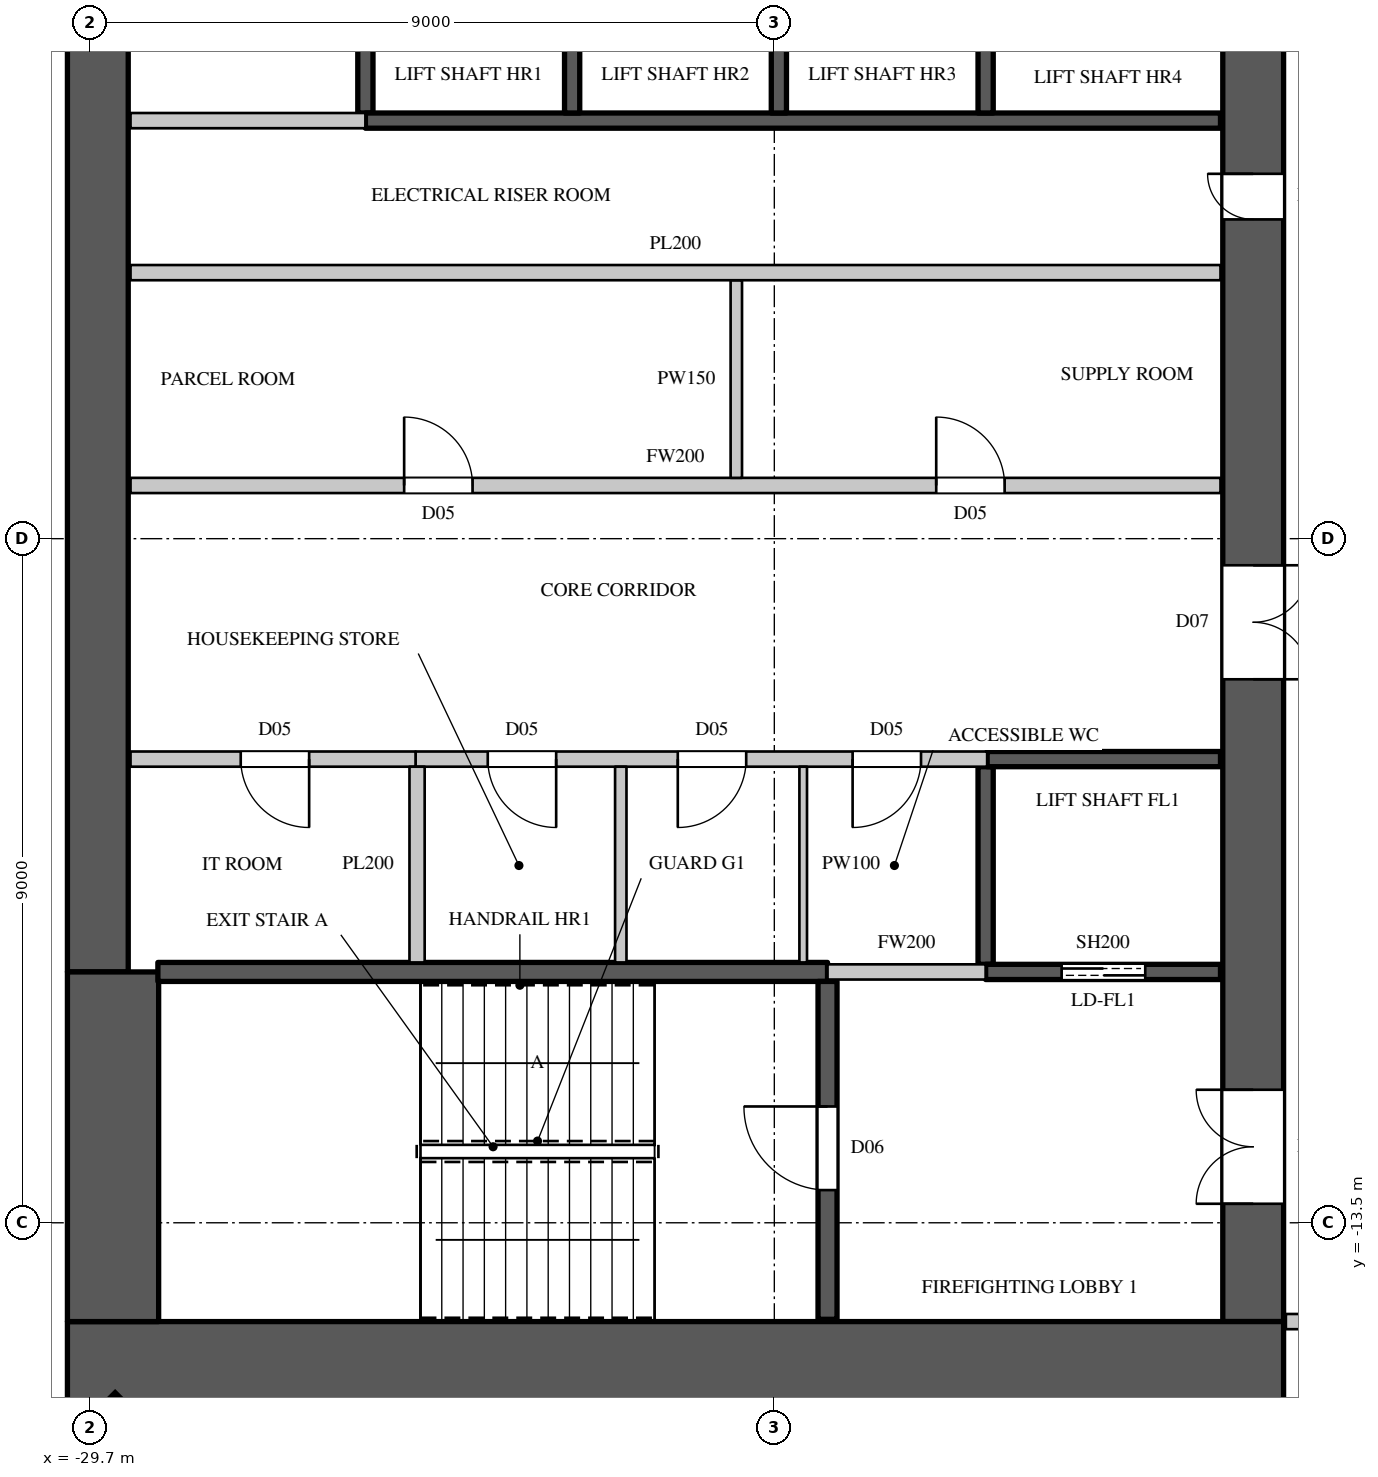
"""IFC4 building model, lengths in metres.
Left out: names, types, materials, properties, quantities, classifications, styles, units other than length and angle.
Written with IfcOpenShell. Run it as: python <this file> out.ifc"""

import sys

from ifc_helpers import new_model, si_unit, direction, frame, frame_2d, origin, origin_2d, place, context, subcontext, project, spatial, rectangle, extrude, element, fill, save


model = new_model("IFC4")
c1 = context("Model", 3, precision=1e-05, world=origin(), true_north=direction((0.0, 1.0)))
c2 = subcontext(c1, "Body", "Model", "MODEL_VIEW")
j1 = project(units=[si_unit("LENGTHUNIT", "METRE"), si_unit("PLANEANGLEUNIT", "RADIAN")], contexts=[c1])
p1 = place(None, origin())
s1 = spatial("IfcSite", under=j1, at=p1, CompositionType="ELEMENT")
p2 = place(p1, origin())
s2 = spatial("IfcBuilding", under=s1, at=p2, CompositionType="ELEMENT")
p3 = place(p2, frame((0.0, 0.0, 213.8)))
s3 = spatial("IfcBuildingStorey", under=s2, at=p3, CompositionType="ELEMENT", Elevation=213.8)
p4 = place(p3, frame((-29.443, -16.443, 0.0), z_axis=(0.0, 0.0, 1.0), x_axis=(0.707106781187, -0.707106781187, 0.0)))
e1 = element("IfcColumn", 1, at=p4, inside=s3, PredefinedType="COLUMN", context=c2, shape_type="SweptSolid", body=[
    extrude(rectangle(XDim=0.9, YDim=1.1, at=origin_2d()), origin(), (0.0, 0.0, 1.0), 4.1),
])
p5 = place(p3, frame((-30.0, -15.4, 0.0), z_axis=(0.0, 0.0, 1.0), x_axis=(1.0, 0.0, 0.0)))
e2 = element("IfcWall", 2, at=p5, inside=s3, PredefinedType="SHEAR", context=c2, shape_type="SweptSolid", body=[
    extrude(rectangle(XDim=16.0, YDim=1.2, at=frame_2d((8.0, 0.0))), origin(), (0.0, 0.0, 1.0), 4.1),
])
p6 = place(p3, frame((-14.4, -14.8, 0.0), z_axis=(0.0, 0.0, 1.0), x_axis=(0.0, 1.0, 0.0)))
e3 = element("IfcWall", 3, at=p6, inside=s3, PredefinedType="SHEAR", context=c2, shape_type="SweptSolid", body=[
    extrude(rectangle(XDim=29.6, YDim=0.8, at=frame_2d((14.8, 0.0))), origin(), (0.0, 0.0, 1.0), 4.1),
])
p7 = place(p6, frame((1.55, 0.0, 0.0)))
e4 = element("IfcOpeningElement", 4, at=p7, cuts=e3, PredefinedType="OPENING", context=c2, shape_type="SweptSolid", body=[
    extrude(rectangle(XDim=1.5, YDim=2.4, at=frame_2d((0.75, 1.2))), frame((0.0, 0.41, 0.0), z_axis=(0.0, -1.0, 0.0), x_axis=(1.0, 0.0, 0.0)), (0.0, 0.0, 1.0), 0.82),
])
p8 = place(p6, frame((26.55, 0.0, 0.0)))
e5 = element("IfcOpeningElement", 5, at=p8, cuts=e3, PredefinedType="OPENING", context=c2, shape_type="SweptSolid", body=[
    extrude(rectangle(XDim=1.5, YDim=2.4, at=frame_2d((0.75, 1.2))), frame((0.0, 0.41, 0.0), z_axis=(0.0, -1.0, 0.0), x_axis=(1.0, 0.0, 0.0)), (0.0, 0.0, 1.0), 0.82),
])
p9 = place(p6, frame((8.45, 0.0, 0.0)))
e6 = element("IfcOpeningElement", 6, at=p9, cuts=e3, PredefinedType="OPENING", context=c2, shape_type="SweptSolid", body=[
    extrude(rectangle(XDim=1.5, YDim=2.4, at=frame_2d((0.75, 1.2))), frame((0.0, 0.41, 0.0), z_axis=(0.0, -1.0, 0.0), x_axis=(1.0, 0.0, 0.0)), (0.0, 0.0, 1.0), 0.82),
])
p10 = place(p6, frame((19.65, 0.0, 0.0)))
e7 = element("IfcOpeningElement", 7, at=p10, cuts=e3, PredefinedType="OPENING", context=c2, shape_type="SweptSolid", body=[
    extrude(rectangle(XDim=1.5, YDim=2.4, at=frame_2d((0.75, 1.2))), frame((0.0, 0.41, 0.0), z_axis=(0.0, -1.0, 0.0), x_axis=(1.0, 0.0, 0.0)), (0.0, 0.0, 1.0), 0.82),
])
p11 = place(p6, frame((14.5, 0.0, 0.0)))
e8 = element("IfcOpeningElement", 8, at=p11, cuts=e3, PredefinedType="OPENING", context=c2, shape_type="SweptSolid", body=[
    extrude(rectangle(XDim=0.6, YDim=2.0, at=frame_2d((0.3, 1.0))), frame((0.0, 0.41, 0.0), z_axis=(0.0, -1.0, 0.0), x_axis=(1.0, 0.0, 0.0)), (0.0, 0.0, 1.0), 0.82),
])
p12 = place(p3, frame((-29.6, -10.2, 0.0), z_axis=(0.0, 0.0, 1.0), x_axis=(0.0, 1.0, 0.0)))
e9 = element("IfcWall", 9, at=p12, inside=s3, PredefinedType="SHEAR", context=c2, shape_type="SweptSolid", body=[
    extrude(rectangle(XDim=20.4, YDim=0.8, at=frame_2d((10.2, 0.0))), origin(), (0.0, 0.0, 1.0), 4.1),
])
p13 = place(p3, frame((-29.4, -14.8, 0.0), z_axis=(0.0, 0.0, 1.0), x_axis=(0.0, 1.0, 0.0)))
e10 = element("IfcWall", 10, at=p13, inside=s3, PredefinedType="SHEAR", context=c2, shape_type="SweptSolid", body=[
    extrude(rectangle(XDim=4.6, YDim=1.2, at=frame_2d((2.3, 0.0))), origin(), (0.0, 0.0, 1.0), 4.1),
])
p14 = place(p3, frame((-29.17, -3.8, 0.0), z_axis=(0.0, 0.0, 1.0), x_axis=(1.0, 0.0, 0.0)))
e11 = element("IfcWall", 11, at=p14, inside=s3, PredefinedType="PARTITIONING", context=c2, shape_type="SweptSolid", body=[
    extrude(rectangle(XDim=14.34, YDim=0.2, at=frame_2d((7.17, 0.0))), origin(), (0.0, 0.0, 1.0), 3.8),
])
p15 = place(p14, frame((3.6, 0.0, 0.0)))
e12 = element("IfcOpeningElement", 12, at=p15, cuts=e11, PredefinedType="OPENING", context=c2, shape_type="SweptSolid", body=[
    extrude(rectangle(XDim=0.9, YDim=2.2, at=frame_2d((0.45, 1.1))), frame((0.0, 0.11, 0.0), z_axis=(0.0, -1.0, 0.0), x_axis=(1.0, 0.0, 0.0)), (0.0, 0.0, 1.0), 0.22),
])
p16 = place(p14, frame((10.6, 0.0, 0.0)))
e13 = element("IfcOpeningElement", 13, at=p16, cuts=e11, PredefinedType="OPENING", context=c2, shape_type="SweptSolid", body=[
    extrude(rectangle(XDim=0.9, YDim=2.2, at=frame_2d((0.45, 1.1))), frame((0.0, 0.11, 0.0), z_axis=(0.0, -1.0, 0.0), x_axis=(1.0, 0.0, 0.0)), (0.0, 0.0, 1.0), 0.22),
])
p17 = place(p3, frame((-25.42, -7.4, 0.0), z_axis=(0.0, 0.0, 1.0), x_axis=(1.0, 0.0, 0.0)))
e14 = element("IfcWall", 14, at=p17, inside=s3, PredefinedType="PARTITIONING", context=c2, shape_type="SweptSolid", body=[
    extrude(rectangle(XDim=7.52, YDim=0.2, at=frame_2d((3.76, 0.0))), origin(), (0.0, 0.0, 1.0), 3.8),
])
p18 = place(p17, frame((0.95, 0.0, 0.0)))
e15 = element("IfcOpeningElement", 15, at=p18, cuts=e14, PredefinedType="OPENING", context=c2, shape_type="SweptSolid", body=[
    extrude(rectangle(XDim=0.9, YDim=2.2, at=frame_2d((0.45, 1.1))), frame((0.0, 0.11, 0.0), z_axis=(0.0, -1.0, 0.0), x_axis=(1.0, 0.0, 0.0)), (0.0, 0.0, 1.0), 0.22),
])
p19 = place(p17, frame((3.45, 0.0, 0.0)))
e16 = element("IfcOpeningElement", 16, at=p19, cuts=e14, PredefinedType="OPENING", context=c2, shape_type="SweptSolid", body=[
    extrude(rectangle(XDim=0.9, YDim=2.2, at=frame_2d((0.45, 1.1))), frame((0.0, 0.11, 0.0), z_axis=(0.0, -1.0, 0.0), x_axis=(1.0, 0.0, 0.0)), (0.0, 0.0, 1.0), 0.22),
])
p20 = place(p17, frame((5.75, 0.0, 0.0)))
e17 = element("IfcOpeningElement", 17, at=p20, cuts=e14, PredefinedType="OPENING", context=c2, shape_type="SweptSolid", body=[
    extrude(rectangle(XDim=0.9, YDim=2.2, at=frame_2d((0.45, 1.1))), frame((0.0, 0.11, 0.0), z_axis=(0.0, -1.0, 0.0), x_axis=(1.0, 0.0, 0.0)), (0.0, 0.0, 1.0), 0.22),
])
p21 = place(p3, frame((-20.0, -10.2, 0.0), z_axis=(0.0, 0.0, 1.0), x_axis=(1.0, 0.0, 0.0)))
e18 = element("IfcWall", 18, at=p21, inside=s3, PredefinedType="PARTITIONING", context=c2, shape_type="SweptSolid", body=[
    extrude(rectangle(XDim=2.08, YDim=0.2, at=frame_2d((1.04, 0.0))), origin(), (0.0, 0.0, 1.0), 3.8),
])
p22 = place(p3, frame((-13.97, -14.8, 0.0), z_axis=(0.0, 0.0, 1.0), x_axis=(1.0, 0.0, 0.0)))
e19 = element("IfcWall", 19, at=p22, inside=s3, PredefinedType="PARTITIONING", context=c2, shape_type="SweptSolid", body=[
    extrude(rectangle(XDim=2.87, YDim=0.2, at=frame_2d((1.435, 0.0))), origin(), (0.0, 0.0, 1.0), 3.8),
])
p23 = place(p3, frame((-22.72, -10.075, 0.0), z_axis=(0.0, 0.0, 1.0), x_axis=(0.0, 1.0, 0.0)))
e20 = element("IfcWall", 20, at=p23, inside=s3, PredefinedType="PARTITIONING", context=c2, shape_type="SweptSolid", body=[
    extrude(rectangle(XDim=2.575, YDim=0.15, at=frame_2d((1.288, 0.0))), origin(), (0.0, 0.0, 1.0), 3.8),
])
p24 = place(p3, frame((-21.2, -3.7, 0.0), z_axis=(0.0, 0.0, 1.0), x_axis=(0.0, 1.0, 0.0)))
e21 = element("IfcWall", 21, at=p24, inside=s3, PredefinedType="PARTITIONING", context=c2, shape_type="SweptSolid", body=[
    extrude(rectangle(XDim=2.6, YDim=0.15, at=frame_2d((1.3, 0.0))), origin(), (0.0, 0.0, 1.0), 3.8),
])
p25 = place(p3, frame((-29.17, -7.4, 0.0), z_axis=(0.0, 0.0, 1.0), x_axis=(1.0, 0.0, 0.0)))
e22 = element("IfcWall", 22, at=p25, inside=s3, PredefinedType="PARTITIONING", context=c2, shape_type="SweptSolid", body=[
    extrude(rectangle(XDim=3.75, YDim=0.2, at=frame_2d((1.875, 0.0))), origin(), (0.0, 0.0, 1.0), 3.8),
])
p26 = place(p25, frame((1.45, 0.0, 0.0)))
e23 = element("IfcOpeningElement", 23, at=p26, cuts=e22, PredefinedType="OPENING", context=c2, shape_type="SweptSolid", body=[
    extrude(rectangle(XDim=0.9, YDim=2.2, at=frame_2d((0.45, 1.1))), frame((0.0, 0.11, 0.0), z_axis=(0.0, -1.0, 0.0), x_axis=(1.0, 0.0, 0.0)), (0.0, 0.0, 1.0), 0.22),
])
p27 = place(p3, frame((-29.17, -1.0, 0.0), z_axis=(0.0, 0.0, 1.0), x_axis=(1.0, 0.0, 0.0)))
e24 = element("IfcWall", 24, at=p27, inside=s3, PredefinedType="PARTITIONING", context=c2, shape_type="SweptSolid", body=[
    extrude(rectangle(XDim=14.34, YDim=0.2, at=frame_2d((7.17, 0.0))), origin(), (0.0, 0.0, 1.0), 3.8),
])
p28 = place(p3, frame((-29.17, 1.0, 0.0), z_axis=(0.0, 0.0, 1.0), x_axis=(1.0, 0.0, 0.0)))
e25 = element("IfcWall", 25, at=p28, inside=s3, PredefinedType="PARTITIONING", context=c2, shape_type="SweptSolid", body=[
    extrude(rectangle(XDim=3.09, YDim=0.2, at=frame_2d((1.545, 0.0))), origin(), (0.0, 0.0, 1.0), 3.8),
])
p29 = place(p3, frame((-25.4, -10.075, 0.0), z_axis=(0.0, 0.0, 1.0), x_axis=(0.0, 1.0, 0.0)))
e26 = element("IfcWall", 26, at=p29, inside=s3, PredefinedType="PARTITIONING", context=c2, shape_type="SweptSolid", body=[
    extrude(rectangle(XDim=2.575, YDim=0.2, at=frame_2d((1.288, 0.0))), origin(), (0.0, 0.0, 1.0), 3.8),
])
p30 = place(p3, frame((-26.08, 1.1, 0.0), z_axis=(0.0, 0.0, 1.0), x_axis=(0.0, 1.0, 0.0)))
e27 = element("IfcWall", 27, at=p30, inside=s3, PredefinedType="SHEAR", context=c2, shape_type="SweptSolid", body=[
    extrude(rectangle(XDim=2.6, YDim=0.2, at=frame_2d((1.3, 0.0))), origin(), (0.0, 0.0, 1.0), 3.8),
])
p31 = place(p3, frame((-26.08, 1.0, 0.0), z_axis=(0.0, 0.0, 1.0), x_axis=(1.0, 0.0, 0.0)))
e28 = element("IfcWall", 28, at=p31, inside=s3, PredefinedType="SHEAR", context=c2, shape_type="SweptSolid", body=[
    extrude(rectangle(XDim=11.25, YDim=0.2, at=frame_2d((5.625, 0.0))), origin(), (0.0, 0.0, 1.0), 3.8),
])
for number, where, z_axis, x_axis in (
    (29, (-23.36, 1.1, 0.0), (0.0, 0.0, 1.0), (0.0, 1.0, 0.0)),
    (30, (-20.64, 1.1, 0.0), (0.0, 0.0, 1.0), (0.0, 1.0, 0.0)),
):
    element("IfcWall", number, at=place(p3, frame(where, z_axis=z_axis, x_axis=x_axis)), inside=s3, PredefinedType="SHEAR", context=c2, shape_type="SweptSolid", body=[
        extrude(rectangle(XDim=2.6, YDim=0.2, at=frame_2d((1.3, 0.0))), origin(), (0.0, 0.0, 1.0), 4.1),
    ])
p32 = place(p3, frame((-17.92, -10.1, 0.0), z_axis=(0.0, 0.0, 1.0), x_axis=(0.0, 1.0, 0.0)))
e31 = element("IfcWall", 31, at=p32, inside=s3, PredefinedType="SHEAR", context=c2, shape_type="SweptSolid", body=[
    extrude(rectangle(XDim=2.6, YDim=0.2, at=frame_2d((1.3, 0.0))), origin(), (0.0, 0.0, 1.0), 3.8),
])
p33 = place(p3, frame((-17.92, -10.2, 0.0), z_axis=(0.0, 0.0, 1.0), x_axis=(1.0, 0.0, 0.0)))
e32 = element("IfcWall", 32, at=p33, inside=s3, PredefinedType="SHEAR", context=c2, shape_type="SweptSolid", body=[
    extrude(rectangle(XDim=3.09, YDim=0.2, at=frame_2d((1.545, 0.0))), origin(), (0.0, 0.0, 1.0), 3.8),
])
p34 = place(p33, frame((1.0, 0.0, 0.0)))
e33 = element("IfcOpeningElement", 33, at=p34, cuts=e32, PredefinedType="OPENING", context=c2, shape_type="SweptSolid", body=[
    extrude(rectangle(XDim=1.1, YDim=2.2, at=frame_2d((0.55, 1.1))), frame((0.0, 0.11, 0.0), z_axis=(0.0, -1.0, 0.0), x_axis=(1.0, 0.0, 0.0)), (0.0, 0.0, 1.0), 0.22),
])
p35 = place(p3, frame((-17.9, -7.4, 0.0), z_axis=(0.0, 0.0, 1.0), x_axis=(1.0, 0.0, 0.0)))
e34 = element("IfcWall", 34, at=p35, inside=s3, PredefinedType="SHEAR", context=c2, shape_type="SweptSolid", body=[
    extrude(rectangle(XDim=3.07, YDim=0.2, at=frame_2d((1.535, 0.0))), origin(), (0.0, 0.0, 1.0), 3.8),
])
p36 = place(p3, frame((-17.92, 1.1, 0.0), z_axis=(0.0, 0.0, 1.0), x_axis=(0.0, 1.0, 0.0)))
e35 = element("IfcWall", 35, at=p36, inside=s3, PredefinedType="SHEAR", context=c2, shape_type="SweptSolid", body=[
    extrude(rectangle(XDim=2.6, YDim=0.2, at=frame_2d((1.3, 0.0))), origin(), (0.0, 0.0, 1.0), 4.1),
])
p37 = place(p3, frame((-28.81, -10.2, 0.0), z_axis=(0.0, 0.0, 1.0), x_axis=(1.0, 0.0, 0.0)))
e36 = element("IfcWall", 36, at=p37, inside=s3, PredefinedType="SHEAR", context=c2, shape_type="SweptSolid", body=[
    extrude(rectangle(XDim=8.81, YDim=0.25, at=frame_2d((4.405, 0.0))), origin(), (0.0, 0.0, 1.0), 3.8),
])
p38 = place(p3, frame((-20.0, -14.77, 0.0), z_axis=(0.0, 0.0, 1.0), x_axis=(0.0, 1.0, 0.0)))
e37 = element("IfcWall", 37, at=p38, inside=s3, PredefinedType="SHEAR", context=c2, shape_type="SweptSolid", body=[
    extrude(rectangle(XDim=4.445, YDim=0.25, at=frame_2d((2.223, 0.0))), origin(), (0.0, 0.0, 1.0), 3.8),
])
p39 = place(p38, frame((1.7, 0.0, 0.0)))
e38 = element("IfcOpeningElement", 38, at=p39, cuts=e37, PredefinedType="OPENING", context=c2, shape_type="SweptSolid", body=[
    extrude(rectangle(XDim=1.1, YDim=2.2, at=frame_2d((0.55, 1.1))), frame((0.0, 0.135, 0.0), z_axis=(0.0, -1.0, 0.0), x_axis=(1.0, 0.0, 0.0)), (0.0, 0.0, 1.0), 0.27),
])
p40 = place(p3, frame((-20.32, -10.075, 0.0), z_axis=(0.0, 0.0, 1.0), x_axis=(0.0, 1.0, 0.0)))
e39 = element("IfcWall", 39, at=p40, inside=s3, PredefinedType="PARTITIONING", context=c2, shape_type="SweptSolid", body=[
    extrude(rectangle(XDim=2.575, YDim=0.1, at=frame_2d((1.288, 0.0))), origin(), (0.0, 0.0, 1.0), 3.8),
])
p41 = place(p39, origin())
e40 = element("IfcDoor", 40, at=p41, inside=s3, OperationType="SINGLE_SWING_RIGHT", PredefinedType="DOOR", context=c2, shape_type="SweptSolid", body=[
    extrude(rectangle(XDim=1.1, YDim=2.2, at=frame_2d((0.55, 1.1))), frame((0.0, 0.025, 0.0), z_axis=(0.0, -1.0, 0.0), x_axis=(1.0, 0.0, 0.0)), (0.0, 0.0, 1.0), 0.05),
])
fill(e38, e40)
p42 = place(p26, origin())
e41 = element("IfcDoor", 41, at=p42, inside=s3, OperationType="SINGLE_SWING_LEFT", PredefinedType="DOOR", context=c2, shape_type="SweptSolid", body=[
    extrude(rectangle(XDim=0.9, YDim=2.2, at=frame_2d((0.45, 1.1))), frame((0.0, 0.025, 0.0), z_axis=(0.0, -1.0, 0.0), x_axis=(1.0, 0.0, 0.0)), (0.0, 0.0, 1.0), 0.05),
])
fill(e23, e41)
p43 = place(p18, origin())
e42 = element("IfcDoor", 42, at=p43, inside=s3, OperationType="SINGLE_SWING_LEFT", PredefinedType="DOOR", context=c2, shape_type="SweptSolid", body=[
    extrude(rectangle(XDim=0.9, YDim=2.2, at=frame_2d((0.45, 1.1))), frame((0.0, 0.025, 0.0), z_axis=(0.0, -1.0, 0.0), x_axis=(1.0, 0.0, 0.0)), (0.0, 0.0, 1.0), 0.05),
])
fill(e15, e42)
p44 = place(p19, origin())
e43 = element("IfcDoor", 43, at=p44, inside=s3, OperationType="SINGLE_SWING_RIGHT", PredefinedType="DOOR", context=c2, shape_type="SweptSolid", body=[
    extrude(rectangle(XDim=0.9, YDim=2.2, at=frame_2d((0.45, 1.1))), frame((0.0, 0.025, 0.0), z_axis=(0.0, -1.0, 0.0), x_axis=(1.0, 0.0, 0.0)), (0.0, 0.0, 1.0), 0.05),
])
fill(e16, e43)
p45 = place(p20, origin())
e44 = element("IfcDoor", 44, at=p45, inside=s3, OperationType="SINGLE_SWING_RIGHT", PredefinedType="DOOR", context=c2, shape_type="SweptSolid", body=[
    extrude(rectangle(XDim=0.9, YDim=2.2, at=frame_2d((0.45, 1.1))), frame((0.0, 0.025, 0.0), z_axis=(0.0, -1.0, 0.0), x_axis=(1.0, 0.0, 0.0)), (0.0, 0.0, 1.0), 0.05),
])
fill(e17, e44)
p46 = place(p15, origin())
e45 = element("IfcDoor", 45, at=p46, inside=s3, OperationType="SINGLE_SWING_LEFT", PredefinedType="DOOR", context=c2, shape_type="SweptSolid", body=[
    extrude(rectangle(XDim=0.9, YDim=2.2, at=frame_2d((0.45, 1.1))), frame((0.0, 0.025, 0.0), z_axis=(0.0, -1.0, 0.0), x_axis=(1.0, 0.0, 0.0)), (0.0, 0.0, 1.0), 0.05),
])
fill(e12, e45)
p47 = place(p16, origin())
e46 = element("IfcDoor", 46, at=p47, inside=s3, OperationType="SINGLE_SWING_LEFT", PredefinedType="DOOR", context=c2, shape_type="SweptSolid", body=[
    extrude(rectangle(XDim=0.9, YDim=2.2, at=frame_2d((0.45, 1.1))), frame((0.0, 0.025, 0.0), z_axis=(0.0, -1.0, 0.0), x_axis=(1.0, 0.0, 0.0)), (0.0, 0.0, 1.0), 0.05),
])
fill(e13, e46)
p48 = place(p34, origin())
e47 = element("IfcDoor", 47, at=p48, inside=s3, OperationType="DOUBLE_DOOR_SLIDING", PredefinedType="DOOR", context=c2, shape_type="SweptSolid", body=[
    extrude(rectangle(XDim=1.1, YDim=2.2, at=frame_2d((0.55, 1.1))), frame((0.0, 0.025, 0.0), z_axis=(0.0, -1.0, 0.0), x_axis=(1.0, 0.0, 0.0)), (0.0, 0.0, 1.0), 0.05),
])
fill(e33, e47)
p49 = place(p7, origin())
e48 = element("IfcDoor", 48, at=p49, inside=s3, OperationType="DOUBLE_DOOR_SINGLE_SWING", PredefinedType="DOOR", context=c2, shape_type="SweptSolid", body=[
    extrude(rectangle(XDim=1.5, YDim=2.4, at=frame_2d((0.75, 1.2))), frame((0.0, 0.395, 0.0), z_axis=(0.0, -1.0, 0.0), x_axis=(1.0, 0.0, 0.0)), (0.0, 0.0, 1.0), 0.05),
])
fill(e4, e48)
p50 = place(p9, origin())
e49 = element("IfcDoor", 49, at=p50, inside=s3, OperationType="DOUBLE_DOOR_SINGLE_SWING", PredefinedType="DOOR", context=c2, shape_type="SweptSolid", body=[
    extrude(rectangle(XDim=1.5, YDim=2.4, at=frame_2d((0.75, 1.2))), frame((0.0, -0.345, 0.0), z_axis=(0.0, -1.0, 0.0), x_axis=(1.0, 0.0, 0.0)), (0.0, 0.0, 1.0), 0.05),
])
fill(e6, e49)
p51 = place(p11, origin())
e50 = element("IfcDoor", 50, at=p51, inside=s3, OperationType="SINGLE_SWING_RIGHT", PredefinedType="DOOR", context=c2, shape_type="SweptSolid", body=[
    extrude(rectangle(XDim=0.6, YDim=2.0, at=frame_2d((0.3, 1.0))), frame((0.0, 0.395, 0.0), z_axis=(0.0, -1.0, 0.0), x_axis=(1.0, 0.0, 0.0)), (0.0, 0.0, 1.0), 0.05),
])
fill(e8, e50)
save(model, sys.argv[1])
